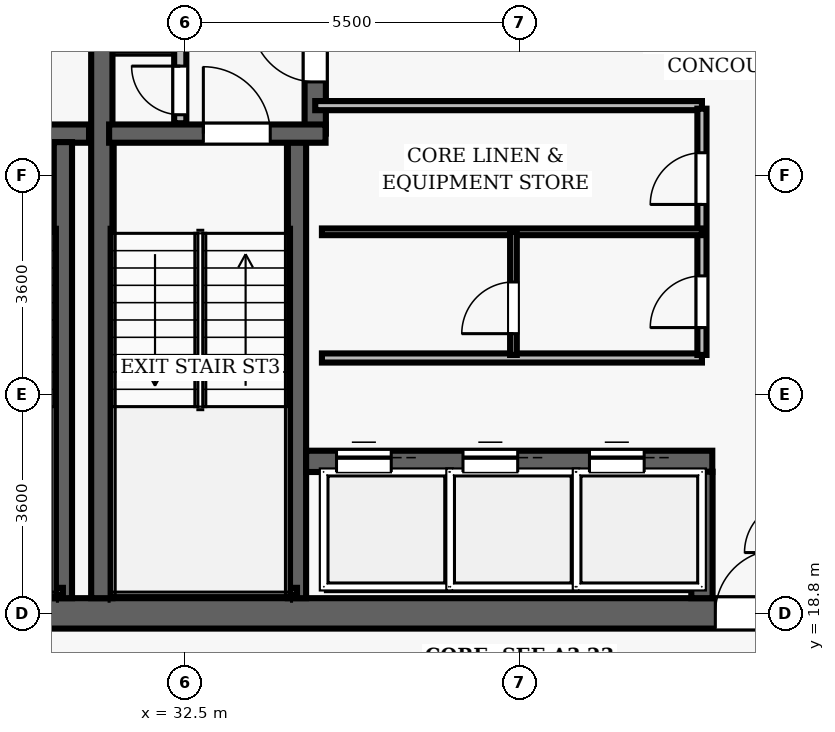
"""IFC4 building model, lengths in metres.
Left out: names, types, materials, properties, quantities, classifications, styles, units other than length and angle.
Written with IfcOpenShell. Run it as: python <this file> out.ifc"""

import sys

from ifc_helpers import new_model, si_unit, direction, frame, frame_2d, origin, place, context, subcontext, project, spatial, rectangle, extrude, element, fill, save


model = new_model("IFC4")
c1 = context("Model", 3, precision=1e-05, world=origin(), true_north=direction((0.0, 1.0)))
c2 = subcontext(c1, "Body", "Model", "MODEL_VIEW")
j1 = project(units=[si_unit("LENGTHUNIT", "METRE"), si_unit("PLANEANGLEUNIT", "RADIAN")], contexts=[c1])
p1 = place(None, origin())
s1 = spatial("IfcSite", under=j1, at=p1, CompositionType="ELEMENT")
p2 = place(p1, origin())
s2 = spatial("IfcBuilding", under=s1, at=p2, CompositionType="ELEMENT")
p3 = place(p2, frame((0.0, 0.0, 217.4)))
s3 = spatial("IfcBuildingStorey", under=s2, at=p3, CompositionType="ELEMENT", Elevation=217.4)
p4 = place(p3, frame((26.75, 18.8, 0.0), z_axis=(0.0, 0.0, 1.0), x_axis=(1.0, 0.0, 0.0)))
e1 = element("IfcWall", 1, at=p4, inside=s3, PredefinedType="SHEAR", context=c2, shape_type="SweptSolid", body=[
    extrude(rectangle(XDim=22.5, YDim=0.5, at=frame_2d((11.25, 0.0))), origin(), (0.0, 0.0, 1.0), 3.85),
])
p5 = place(p4, frame((14.47, 0.0, 0.0)))
e2 = element("IfcOpeningElement", 2, at=p5, cuts=e1, PredefinedType="OPENING", context=c2, shape_type="SweptSolid", body=[
    extrude(rectangle(XDim=1.05, YDim=2.15, at=frame_2d((0.525, 1.075))), frame((0.0, 0.26, 0.0), z_axis=(0.0, -1.0, 0.0), x_axis=(1.0, 0.0, 0.0)), (0.0, 0.0, 1.0), 0.52),
])
p6 = place(p3, frame((31.13, 19.05, 0.0), z_axis=(0.0, 0.0, 1.0), x_axis=(0.0, 1.0, 0.0)))
e3 = element("IfcWall", 3, at=p6, inside=s3, PredefinedType="SHEAR", context=c2, shape_type="SweptSolid", body=[
    extrude(rectangle(XDim=13.9, YDim=0.35, at=frame_2d((6.95, 0.0))), origin(), (0.0, 0.0, 1.0), 3.85),
])
p7 = place(p3, frame((27.25, 26.69, 0.0), z_axis=(0.0, 0.0, 1.0), x_axis=(1.0, 0.0, 0.0)))
e4 = element("IfcWall", 4, at=p7, inside=s3, PredefinedType="SHEAR", context=c2, shape_type="SweptSolid", body=[
    extrude(rectangle(XDim=3.67, YDim=0.3, at=frame_2d((1.835, 0.0))), origin(), (0.0, 0.0, 1.0), 3.85),
])
p8 = place(p7, frame((1.05, 0.0, 0.0)))
e5 = element("IfcOpeningElement", 5, at=p8, cuts=e4, PredefinedType="OPENING", context=c2, shape_type="SweptSolid", body=[
    extrude(rectangle(XDim=1.1, YDim=2.15, at=frame_2d((0.55, 1.075))), frame((0.0, 0.16, 0.0), z_axis=(0.0, -1.0, 0.0), x_axis=(1.0, 0.0, 0.0)), (0.0, 0.0, 1.0), 0.32),
])
p9 = place(p3, frame((30.49, 19.05, 0.0), z_axis=(0.0, 0.0, 1.0), x_axis=(0.0, 1.0, 0.0)))
e6 = element("IfcWall", 6, at=p9, inside=s3, PredefinedType="SHEAR", context=c2, shape_type="SweptSolid", body=[
    extrude(rectangle(XDim=7.5, YDim=0.3, at=frame_2d((3.75, 0.0))), origin(), (0.0, 0.0, 1.0), 3.85),
])
p10 = place(p3, frame((27.395, 19.16, 0.0), z_axis=(0.0, 0.0, 1.0), x_axis=(1.0, 0.0, 0.0)))
e7 = element("IfcWall", 7, at=p10, inside=s3, PredefinedType="SHEAR", context=c2, shape_type="SweptSolid", body=[
    extrude(rectangle(XDim=3.095, YDim=0.12, at=frame_2d((1.547, 0.0))), origin(), (0.0, 0.0, 1.0), 3.85),
])
p11 = place(p3, frame((34.34, 19.05, 0.0), z_axis=(0.0, 0.0, 1.0), x_axis=(0.0, 1.0, 0.0)))
e8 = element("IfcWall", 8, at=p11, inside=s3, PredefinedType="SHEAR", context=c2, shape_type="SweptSolid", body=[
    extrude(rectangle(XDim=7.5, YDim=0.3, at=frame_2d((3.75, 0.0))), origin(), (0.0, 0.0, 1.0), 3.85),
])
p12 = place(p3, frame((34.64, 26.69, 0.0), z_axis=(0.0, 0.0, 1.0), x_axis=(0.0, 1.0, 0.0)))
e9 = element("IfcWall", 9, at=p12, inside=s3, PredefinedType="SHEAR", context=c2, shape_type="SweptSolid", body=[
    extrude(rectangle(XDim=6.26, YDim=0.35, at=frame_2d((3.13, 0.0))), origin(), (0.0, 0.0, 1.0), 3.85),
])
p13 = place(p12, frame((0.85, 0.0, 0.0)))
e10 = element("IfcOpeningElement", 10, at=p13, cuts=e9, PredefinedType="OPENING", context=c2, shape_type="SweptSolid", body=[
    extrude(rectangle(XDim=1.05, YDim=2.15, at=frame_2d((0.525, 1.075))), frame((0.0, 0.185, 0.0), z_axis=(0.0, -1.0, 0.0), x_axis=(1.0, 0.0, 0.0)), (0.0, 0.0, 1.0), 0.37),
])
p14 = place(p3, frame((31.25, 26.69, 0.0), z_axis=(0.0, 0.0, 1.0), x_axis=(1.0, 0.0, 0.0)))
e11 = element("IfcWall", 11, at=p14, inside=s3, PredefinedType="SHEAR", context=c2, shape_type="SweptSolid", body=[
    extrude(rectangle(XDim=3.56, YDim=0.3, at=frame_2d((1.78, 0.0))), origin(), (0.0, 0.0, 1.0), 3.85),
])
p15 = place(p14, frame((1.55, 0.0, 0.0)))
e12 = element("IfcOpeningElement", 12, at=p15, cuts=e11, PredefinedType="OPENING", context=c2, shape_type="SweptSolid", body=[
    extrude(rectangle(XDim=1.1, YDim=2.15, at=frame_2d((0.55, 1.075))), frame((0.0, 0.16, 0.0), z_axis=(0.0, -1.0, 0.0), x_axis=(1.0, 0.0, 0.0)), (0.0, 0.0, 1.0), 0.32),
])
p16 = place(p3, frame((31.3, 19.16, 0.0), z_axis=(0.0, 0.0, 1.0), x_axis=(1.0, 0.0, 0.0)))
e13 = element("IfcWall", 13, at=p16, inside=s3, PredefinedType="SHEAR", context=c2, shape_type="SweptSolid", body=[
    extrude(rectangle(XDim=3.04, YDim=0.12, at=frame_2d((1.52, 0.0))), origin(), (0.0, 0.0, 1.0), 3.85),
])
p17 = place(p3, frame((32.42, 26.86, 0.0), z_axis=(0.0, 0.0, 1.0), x_axis=(0.0, 1.0, 0.0)))
e14 = element("IfcWall", 14, at=p17, inside=s3, PredefinedType="PARTITIONING", context=c2, shape_type="SweptSolid", body=[
    extrude(rectangle(XDim=2.04, YDim=0.2, at=frame_2d((1.02, 0.0))), origin(), (0.0, 0.0, 1.0), 3.035),
])
p18 = place(p17, frame((0.14, 0.0, 0.0)))
e15 = element("IfcOpeningElement", 15, at=p18, cuts=e14, PredefinedType="OPENING", context=c2, shape_type="SweptSolid", body=[
    extrude(rectangle(XDim=0.8, YDim=2.05, at=frame_2d((0.4, 1.025))), frame((0.0, 0.11, 0.0), z_axis=(0.0, -1.0, 0.0), x_axis=(1.0, 0.0, 0.0)), (0.0, 0.0, 1.0), 0.22),
])
p19 = place(p3, frame((34.49, 21.3, 0.0), z_axis=(0.0, 0.0, 1.0), x_axis=(1.0, 0.0, 0.0)))
e16 = element("IfcWall", 16, at=p19, inside=s3, PredefinedType="SHEAR", context=c2, shape_type="SweptSolid", body=[
    extrude(rectangle(XDim=6.68, YDim=0.35, at=frame_2d((3.34, 0.0))), origin(), (0.0, 0.0, 1.0), 3.035),
])
p20 = place(p19, frame((0.5, 0.0, 0.0)))
e17 = element("IfcOpeningElement", 17, at=p20, cuts=e16, PredefinedType="OPENING", context=c2, shape_type="SweptSolid", body=[
    extrude(rectangle(XDim=0.9, YDim=2.15, at=frame_2d((0.45, 1.075))), frame((0.0, 0.185, 0.0), z_axis=(0.0, -1.0, 0.0), x_axis=(1.0, 0.0, 0.0)), (0.0, 0.0, 1.0), 0.37),
])
p21 = place(p19, frame((2.58, 0.0, 0.0)))
e18 = element("IfcOpeningElement", 18, at=p21, cuts=e16, PredefinedType="OPENING", context=c2, shape_type="SweptSolid", body=[
    extrude(rectangle(XDim=0.9, YDim=2.15, at=frame_2d((0.45, 1.075))), frame((0.0, 0.185, 0.0), z_axis=(0.0, -1.0, 0.0), x_axis=(1.0, 0.0, 0.0)), (0.0, 0.0, 1.0), 0.37),
])
p22 = place(p19, frame((4.66, 0.0, 0.0)))
e19 = element("IfcOpeningElement", 19, at=p22, cuts=e16, PredefinedType="OPENING", context=c2, shape_type="SweptSolid", body=[
    extrude(rectangle(XDim=0.9, YDim=2.15, at=frame_2d((0.45, 1.075))), frame((0.0, 0.185, 0.0), z_axis=(0.0, -1.0, 0.0), x_axis=(1.0, 0.0, 0.0)), (0.0, 0.0, 1.0), 0.37),
])
p23 = place(p3, frame((41.0, 19.05, 0.0), z_axis=(0.0, 0.0, 1.0), x_axis=(0.0, 1.0, 0.0)))
e20 = element("IfcWall", 20, at=p23, inside=s3, PredefinedType="SHEAR", context=c2, shape_type="SweptSolid", body=[
    extrude(rectangle(XDim=2.08, YDim=0.35, at=frame_2d((1.04, 0.0))), origin(), (0.0, 0.0, 1.0), 3.035),
])
p24 = place(p3, frame((34.75, 23.0, 0.0), z_axis=(0.0, 0.0, 1.0), x_axis=(1.0, 0.0, 0.0)))
e21 = element("IfcWall", 21, at=p24, inside=s3, PredefinedType="PARTITIONING", context=c2, shape_type="SweptSolid", body=[
    extrude(rectangle(XDim=6.25, YDim=0.15, at=frame_2d((3.125, 0.0))), origin(), (0.0, 0.0, 1.0), 3.035),
])
p25 = place(p3, frame((34.64, 27.15, 0.0), z_axis=(0.0, 0.0, 1.0), x_axis=(1.0, 0.0, 0.0)))
e22 = element("IfcWall", 22, at=p25, inside=s3, PredefinedType="PARTITIONING", context=c2, shape_type="SweptSolid", body=[
    extrude(rectangle(XDim=6.36, YDim=0.15, at=frame_2d((3.18, 0.0))), origin(), (0.0, 0.0, 1.0), 3.035),
])
p26 = place(p3, frame((41.0, 23.05, 0.0), z_axis=(0.0, 0.0, 1.0), x_axis=(0.0, 1.0, 0.0)))
e23 = element("IfcWall", 23, at=p26, inside=s3, PredefinedType="PARTITIONING", context=c2, shape_type="SweptSolid", body=[
    extrude(rectangle(XDim=4.05, YDim=0.15, at=frame_2d((2.025, 0.0))), origin(), (0.0, 0.0, 1.0), 3.035),
])
p27 = place(p26, frame((2.475, 0.0, 0.0)))
e24 = element("IfcOpeningElement", 24, at=p27, cuts=e23, PredefinedType="OPENING", context=c2, shape_type="SweptSolid", body=[
    extrude(rectangle(XDim=0.85, YDim=2.1, at=frame_2d((0.425, 1.05))), frame((0.0, 0.085, 0.0), z_axis=(0.0, -1.0, 0.0), x_axis=(1.0, 0.0, 0.0)), (0.0, 0.0, 1.0), 0.17),
])
p28 = place(p26, frame((0.45, 0.0, 0.0)))
e25 = element("IfcOpeningElement", 25, at=p28, cuts=e23, PredefinedType="OPENING", context=c2, shape_type="SweptSolid", body=[
    extrude(rectangle(XDim=0.85, YDim=2.1, at=frame_2d((0.425, 1.05))), frame((0.0, 0.085, 0.0), z_axis=(0.0, -1.0, 0.0), x_axis=(1.0, 0.0, 0.0)), (0.0, 0.0, 1.0), 0.17),
])
p29 = place(p3, frame((34.75, 25.075, 0.0), z_axis=(0.0, 0.0, 1.0), x_axis=(1.0, 0.0, 0.0)))
e26 = element("IfcWall", 26, at=p29, inside=s3, PredefinedType="PARTITIONING", context=c2, shape_type="SweptSolid", body=[
    extrude(rectangle(XDim=6.25, YDim=0.11, at=frame_2d((3.125, 0.0))), origin(), (0.0, 0.0, 1.0), 3.035),
])
p30 = place(p3, frame((37.9, 23.05, 0.0), z_axis=(0.0, 0.0, 1.0), x_axis=(0.0, 1.0, 0.0)))
e27 = element("IfcWall", 27, at=p30, inside=s3, PredefinedType="PARTITIONING", context=c2, shape_type="SweptSolid", body=[
    extrude(rectangle(XDim=2.025, YDim=0.11, at=frame_2d((1.012, 0.0))), origin(), (0.0, 0.0, 1.0), 3.035),
])
p31 = place(p30, frame((0.35, 0.0, 0.0)))
e28 = element("IfcOpeningElement", 28, at=p31, cuts=e27, PredefinedType="OPENING", context=c2, shape_type="SweptSolid", body=[
    extrude(rectangle(XDim=0.85, YDim=2.1, at=frame_2d((0.425, 1.05))), frame((0.0, 0.065, 0.0), z_axis=(0.0, -1.0, 0.0), x_axis=(1.0, 0.0, 0.0)), (0.0, 0.0, 1.0), 0.13),
])
p32 = place(p15, origin())
e29 = element("IfcDoor", 29, at=p32, inside=s3, OperationType="SINGLE_SWING_LEFT", PredefinedType="DOOR", context=c2, shape_type="SweptSolid", body=[
    extrude(rectangle(XDim=1.1, YDim=2.15, at=frame_2d((0.55, 1.075))), frame((0.0, 0.025, 0.0), z_axis=(0.0, -1.0, 0.0), x_axis=(1.0, 0.0, 0.0)), (0.0, 0.0, 1.0), 0.05),
])
fill(e12, e29)
p33 = place(p18, origin())
e30 = element("IfcDoor", 30, at=p33, inside=s3, OperationType="SINGLE_SWING_RIGHT", PredefinedType="DOOR", context=c2, shape_type="SweptSolid", body=[
    extrude(rectangle(XDim=0.8, YDim=2.05, at=frame_2d((0.4, 1.025))), frame((0.0, 0.025, 0.0), z_axis=(0.0, -1.0, 0.0), x_axis=(1.0, 0.0, 0.0)), (0.0, 0.0, 1.0), 0.05),
])
fill(e15, e30)
p34 = place(p5, origin())
e31 = element("IfcDoor", 31, at=p34, inside=s3, OperationType="SINGLE_SWING_RIGHT", PredefinedType="DOOR", context=c2, shape_type="SweptSolid", body=[
    extrude(rectangle(XDim=1.05, YDim=2.15, at=frame_2d((0.525, 1.075))), frame((0.0, 0.025, 0.0), z_axis=(0.0, -1.0, 0.0), x_axis=(1.0, 0.0, 0.0)), (0.0, 0.0, 1.0), 0.05),
])
fill(e2, e31)
p35 = place(p13, origin())
e32 = element("IfcDoor", 32, at=p35, inside=s3, OperationType="SINGLE_SWING_RIGHT", PredefinedType="DOOR", context=c2, shape_type="SweptSolid", body=[
    extrude(rectangle(XDim=1.05, YDim=2.15, at=frame_2d((0.525, 1.075))), frame((0.0, 0.025, 0.0), z_axis=(0.0, -1.0, 0.0), x_axis=(1.0, 0.0, 0.0)), (0.0, 0.0, 1.0), 0.05),
])
fill(e10, e32)
p36 = place(p27, origin())
e33 = element("IfcDoor", 33, at=p36, inside=s3, OperationType="SINGLE_SWING_LEFT", PredefinedType="DOOR", context=c2, shape_type="SweptSolid", body=[
    extrude(rectangle(XDim=0.85, YDim=2.1, at=frame_2d((0.425, 1.05))), frame((0.0, 0.025, 0.0), z_axis=(0.0, -1.0, 0.0), x_axis=(1.0, 0.0, 0.0)), (0.0, 0.0, 1.0), 0.05),
])
fill(e24, e33)
p37 = place(p28, origin())
e34 = element("IfcDoor", 34, at=p37, inside=s3, OperationType="SINGLE_SWING_LEFT", PredefinedType="DOOR", context=c2, shape_type="SweptSolid", body=[
    extrude(rectangle(XDim=0.85, YDim=2.1, at=frame_2d((0.425, 1.05))), frame((0.0, 0.025, 0.0), z_axis=(0.0, -1.0, 0.0), x_axis=(1.0, 0.0, 0.0)), (0.0, 0.0, 1.0), 0.05),
])
fill(e25, e34)
p38 = place(p31, origin())
e35 = element("IfcDoor", 35, at=p38, inside=s3, OperationType="SINGLE_SWING_LEFT", PredefinedType="DOOR", context=c2, shape_type="SweptSolid", body=[
    extrude(rectangle(XDim=0.85, YDim=2.1, at=frame_2d((0.425, 1.05))), frame((0.0, 0.025, 0.0), z_axis=(0.0, -1.0, 0.0), x_axis=(1.0, 0.0, 0.0)), (0.0, 0.0, 1.0), 0.05),
])
fill(e28, e35)
p39 = place(p20, origin())
e36 = element("IfcDoor", 36, at=p39, inside=s3, OperationType="SLIDING_TO_LEFT", PredefinedType="DOOR", context=c2, shape_type="SweptSolid", body=[
    extrude(rectangle(XDim=0.9, YDim=2.15, at=frame_2d((0.45, 1.075))), frame((0.0, 0.025, 0.0), z_axis=(0.0, -1.0, 0.0), x_axis=(1.0, 0.0, 0.0)), (0.0, 0.0, 1.0), 0.05),
])
fill(e17, e36)
p40 = place(p21, origin())
e37 = element("IfcDoor", 37, at=p40, inside=s3, OperationType="SLIDING_TO_LEFT", PredefinedType="DOOR", context=c2, shape_type="SweptSolid", body=[
    extrude(rectangle(XDim=0.9, YDim=2.15, at=frame_2d((0.45, 1.075))), frame((0.0, 0.025, 0.0), z_axis=(0.0, -1.0, 0.0), x_axis=(1.0, 0.0, 0.0)), (0.0, 0.0, 1.0), 0.05),
])
fill(e18, e37)
p41 = place(p22, origin())
e38 = element("IfcDoor", 38, at=p41, inside=s3, OperationType="SLIDING_TO_LEFT", PredefinedType="DOOR", context=c2, shape_type="SweptSolid", body=[
    extrude(rectangle(XDim=0.9, YDim=2.15, at=frame_2d((0.45, 1.075))), frame((0.0, 0.025, 0.0), z_axis=(0.0, -1.0, 0.0), x_axis=(1.0, 0.0, 0.0)), (0.0, 0.0, 1.0), 0.05),
])
fill(e19, e38)
save(model, sys.argv[1])
